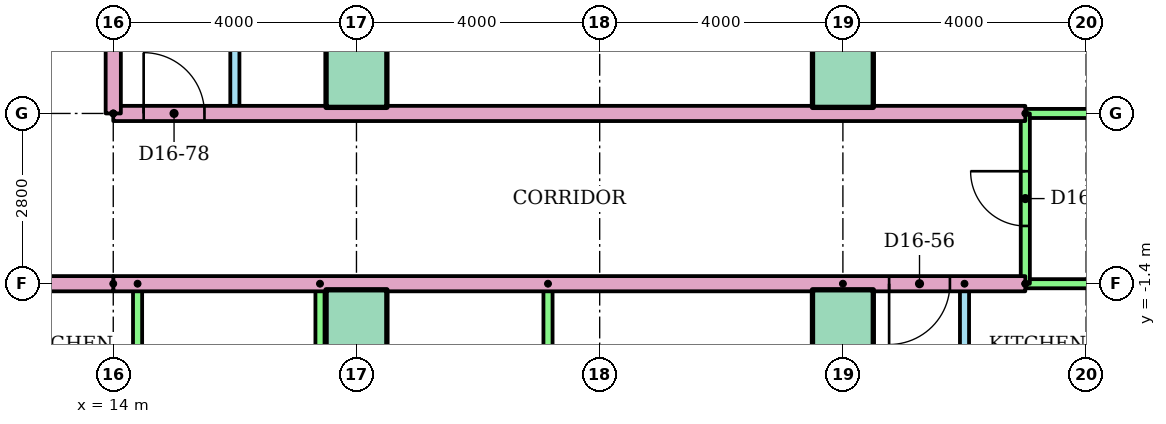
"""IFC4 building model, lengths in metres.
Left out: names, types, materials, properties, quantities, classifications, styles, units other than length and angle.
Written with IfcOpenShell. Run it as: python <this file> out.ifc"""

import sys

from ifc_helpers import new_model, si_unit, direction, frame, frame_2d, origin, origin_2d, place, context, subcontext, project, spatial, rectangle, extrude, element, fill, save


model = new_model("IFC4")
c1 = context("Model", 3, precision=1e-05, world=origin(), true_north=direction((0.0, 1.0)))
c2 = subcontext(c1, "Body", "Model", "MODEL_VIEW")
j1 = project(units=[si_unit("LENGTHUNIT", "METRE"), si_unit("PLANEANGLEUNIT", "RADIAN")], contexts=[c1])
p1 = place(None, origin())
s1 = spatial("IfcSite", under=j1, at=p1, CompositionType="ELEMENT")
p2 = place(p1, origin())
s2 = spatial("IfcBuilding", under=s1, at=p2, CompositionType="ELEMENT")
p3 = place(p2, frame((0.0, 0.0, 60.8)))
s3 = spatial("IfcBuildingStorey", under=s2, at=p3, CompositionType="ELEMENT", Elevation=60.8)
for number, where in (
    (1, (18.0, -2.0, 0.0)),
    (2, (26.0, -2.0, 0.0)),
    (3, (18.0, 2.0, 0.0)),
    (4, (26.0, 2.0, 0.0)),
):
    element("IfcColumn", number, at=place(p3, frame(where)), inside=s3, PredefinedType="COLUMN", context=c2, shape_type="SweptSolid", body=[
        extrude(rectangle(XDim=1.0, YDim=1.0, at=origin_2d()), origin(), (0.0, 0.0, 1.0), 3.2),
    ])
for number, where, z_axis, x_axis in (
    (5, (14.4, -1.4, 0.0), (0.0, 0.0, 1.0), (0.0, -1.0, 0.0)),
    (6, (17.4, -1.4, 0.0), (0.0, 0.0, 1.0), (0.0, -1.0, 0.0)),
    (7, (21.15, -1.4, 0.0), (0.0, 0.0, 1.0), (0.0, -1.0, 0.0)),
):
    element("IfcWall", number, at=place(p3, frame(where, z_axis=z_axis, x_axis=x_axis)), inside=s3, PredefinedType="PARTITIONING", context=c2, shape_type="SweptSolid", body=[
        extrude(rectangle(XDim=5.2, YDim=0.15, at=frame_2d((2.6, 0.0))), origin(), (0.0, 0.0, 1.0), 2.4),
    ])
p4 = place(p3, frame((28.0, -1.4, 0.0), z_axis=(0.0, 0.0, 1.0), x_axis=(0.0, -1.0, 0.0)))
e8 = element("IfcWall", 8, at=p4, inside=s3, PredefinedType="PARTITIONING", context=c2, shape_type="SweptSolid", body=[
    extrude(rectangle(XDim=5.2, YDim=0.15, at=frame_2d((2.6, 0.0))), origin(), (0.0, 0.0, 1.0), 2.4),
])
p5 = place(p4, frame((1.36, 0.0, 0.0)))
e9 = element("IfcOpeningElement", 9, at=p5, cuts=e8, PredefinedType="OPENING", context=c2, shape_type="SweptSolid", body=[
    extrude(rectangle(XDim=0.9, YDim=2.1, at=frame_2d((0.45, 1.05))), frame((0.0, 0.085, 0.0), z_axis=(0.0, -1.0, 0.0), x_axis=(1.0, 0.0, 0.0)), (0.0, 0.0, 1.0), 0.17),
])
p6 = place(p4, frame((3.575, 0.0, 0.0)))
e10 = element("IfcOpeningElement", 10, at=p6, cuts=e8, PredefinedType="OPENING", context=c2, shape_type="SweptSolid", body=[
    extrude(rectangle(XDim=0.8, YDim=2.1, at=frame_2d((0.4, 1.05))), frame((0.0, 0.085, 0.0), z_axis=(0.0, -1.0, 0.0), x_axis=(1.0, 0.0, 0.0)), (0.0, 0.0, 1.0), 0.17),
])
p7 = place(p3, frame((26.0, -1.4, 0.0), z_axis=(0.0, 0.0, 1.0), x_axis=(0.0, -1.0, 0.0)))
e11 = element("IfcWall", 11, at=p7, inside=s3, PredefinedType="PARTITIONING", context=c2, shape_type="SweptSolid", body=[
    extrude(rectangle(XDim=14.71, YDim=0.25, at=frame_2d((7.355, 0.0))), origin(), (0.0, 0.0, 1.0), 2.4),
])
p8 = place(p3, frame((29.0, -1.4, 0.0), z_axis=(0.0, 0.0, 1.0), x_axis=(-1.0, 0.0, 0.0)))
e12 = element("IfcWall", 12, at=p8, inside=s3, PredefinedType="PARTITIONING", context=c2, shape_type="SweptSolid", body=[
    extrude(rectangle(XDim=15.0, YDim=0.25, at=frame_2d((7.5, 0.0))), origin(), (0.0, 0.0, 1.0), 2.4),
])
p9 = place(p8, frame((1.24, 0.0, 0.0)))
e13 = element("IfcOpeningElement", 13, at=p9, cuts=e12, PredefinedType="OPENING", context=c2, shape_type="SweptSolid", body=[
    extrude(rectangle(XDim=1.0, YDim=2.1, at=frame_2d((0.5, 1.05))), frame((0.0, 0.135, 0.0), z_axis=(0.0, -1.0, 0.0), x_axis=(1.0, 0.0, 0.0)), (0.0, 0.0, 1.0), 0.27),
])
p10 = place(p3, frame((36.52, -1.4, 0.0), z_axis=(0.0, 0.0, 1.0), x_axis=(-1.0, 0.0, 0.0)))
e14 = element("IfcWall", 14, at=p10, inside=s3, PredefinedType="PARTITIONING", context=c2, shape_type="SweptSolid", body=[
    extrude(rectangle(XDim=7.52, YDim=0.15, at=frame_2d((3.76, 0.0))), origin(), (0.0, 0.0, 1.0), 2.4),
])
p11 = place(p3, frame((16.0, 9.0, 0.0), z_axis=(0.0, 0.0, 1.0), x_axis=(0.0, -1.0, 0.0)))
e15 = element("IfcWall", 15, at=p11, inside=s3, PredefinedType="PARTITIONING", context=c2, shape_type="SweptSolid", body=[
    extrude(rectangle(XDim=7.6, YDim=0.15, at=frame_2d((3.8, 0.0))), origin(), (0.0, 0.0, 1.0), 2.4),
])
p12 = place(p11, frame((5.025, 0.0, 0.0)))
e16 = element("IfcOpeningElement", 16, at=p12, cuts=e15, PredefinedType="OPENING", context=c2, shape_type="SweptSolid", body=[
    extrude(rectangle(XDim=0.9, YDim=2.1, at=frame_2d((0.45, 1.05))), frame((0.0, 0.085, 0.0), z_axis=(0.0, -1.0, 0.0), x_axis=(1.0, 0.0, 0.0)), (0.0, 0.0, 1.0), 0.17),
])
p13 = place(p11, frame((1.275, 0.0, 0.0)))
e17 = element("IfcOpeningElement", 17, at=p13, cuts=e15, PredefinedType="OPENING", context=c2, shape_type="SweptSolid", body=[
    extrude(rectangle(XDim=0.8, YDim=2.1, at=frame_2d((0.4, 1.05))), frame((0.0, 0.085, 0.0), z_axis=(0.0, -1.0, 0.0), x_axis=(1.0, 0.0, 0.0)), (0.0, 0.0, 1.0), 0.17),
])
for number, where, z_axis, x_axis in (
    (18, (18.4, 9.0, 0.0), (0.0, 0.0, 1.0), (0.0, -1.0, 0.0)),
    (19, (25.9, 9.0, 0.0), (0.0, 0.0, 1.0), (0.0, -1.0, 0.0)),
):
    element("IfcWall", number, at=place(p3, frame(where, z_axis=z_axis, x_axis=x_axis)), inside=s3, PredefinedType="PARTITIONING", context=c2, shape_type="SweptSolid", body=[
        extrude(rectangle(XDim=7.6, YDim=0.15, at=frame_2d((3.8, 0.0))), origin(), (0.0, 0.0, 1.0), 2.4),
    ])
p14 = place(p3, frame((14.0, 1.4, 0.0)))
e20 = element("IfcWall", 20, at=p14, inside=s3, PredefinedType="PARTITIONING", context=c2, shape_type="SweptSolid", body=[
    extrude(rectangle(XDim=15.0, YDim=0.25, at=frame_2d((7.5, 0.0))), origin(), (0.0, 0.0, 1.0), 2.4),
])
p15 = place(p14, frame((0.5, 0.0, 0.0)))
e21 = element("IfcOpeningElement", 21, at=p15, cuts=e20, PredefinedType="OPENING", context=c2, shape_type="SweptSolid", body=[
    extrude(rectangle(XDim=1.0, YDim=2.1, at=frame_2d((0.5, 1.05))), frame((0.0, 0.135, 0.0), z_axis=(0.0, -1.0, 0.0), x_axis=(1.0, 0.0, 0.0)), (0.0, 0.0, 1.0), 0.27),
])
p16 = place(p3, frame((29.0, 1.4, 0.0)))
e22 = element("IfcWall", 22, at=p16, inside=s3, PredefinedType="PARTITIONING", context=c2, shape_type="SweptSolid", body=[
    extrude(rectangle(XDim=7.52, YDim=0.15, at=frame_2d((3.76, 0.0))), origin(), (0.0, 0.0, 1.0), 2.4),
])
p17 = place(p3, frame((29.0, -1.4, 0.0), z_axis=(0.0, 0.0, 1.0), x_axis=(0.0, 1.0, 0.0)))
e23 = element("IfcWall", 23, at=p17, inside=s3, PredefinedType="PARTITIONING", context=c2, shape_type="SweptSolid", body=[
    extrude(rectangle(XDim=2.8, YDim=0.15, at=frame_2d((1.4, 0.0))), origin(), (0.0, 0.0, 1.0), 2.4),
])
p18 = place(p17, frame((0.95, 0.0, 0.0)))
e24 = element("IfcOpeningElement", 24, at=p18, cuts=e23, PredefinedType="OPENING", context=c2, shape_type="SweptSolid", body=[
    extrude(rectangle(XDim=0.9, YDim=2.1, at=frame_2d((0.45, 1.05))), frame((0.0, 0.085, 0.0), z_axis=(0.0, -1.0, 0.0), x_axis=(1.0, 0.0, 0.0)), (0.0, 0.0, 1.0), 0.17),
])
p19 = place(p3, frame((14.0, -1.4, 0.0), z_axis=(0.0, 0.0, 1.0), x_axis=(-1.0, 0.0, 0.0)))
e25 = element("IfcWall", 25, at=p19, inside=s3, PredefinedType="PARTITIONING", context=c2, shape_type="SweptSolid", body=[
    extrude(rectangle(XDim=28.0, YDim=0.25, at=frame_2d((14.0, 0.0))), origin(), (0.0, 0.0, 1.0), 2.4),
])
p20 = place(p19, frame((20.76, 0.0, 0.0)))
e26 = element("IfcOpeningElement", 26, at=p20, cuts=e25, PredefinedType="OPENING", context=c2, shape_type="SweptSolid", body=[
    extrude(rectangle(XDim=1.0, YDim=2.1, at=frame_2d((0.5, 1.05))), frame((0.0, 0.135, 0.0), z_axis=(0.0, -1.0, 0.0), x_axis=(1.0, 0.0, 0.0)), (0.0, 0.0, 1.0), 0.27),
])
p21 = place(p19, frame((18.24, 0.0, 0.0)))
e27 = element("IfcOpeningElement", 27, at=p21, cuts=e25, PredefinedType="OPENING", context=c2, shape_type="SweptSolid", body=[
    extrude(rectangle(XDim=1.0, YDim=2.1, at=frame_2d((0.5, 1.05))), frame((0.0, 0.135, 0.0), z_axis=(0.0, -1.0, 0.0), x_axis=(1.0, 0.0, 0.0)), (0.0, 0.0, 1.0), 0.27),
])
p22 = place(p19, frame((2.24, 0.0, 0.0)))
e28 = element("IfcOpeningElement", 28, at=p22, cuts=e25, PredefinedType="OPENING", context=c2, shape_type="SweptSolid", body=[
    extrude(rectangle(XDim=1.0, YDim=2.1, at=frame_2d((0.5, 1.05))), frame((0.0, 0.135, 0.0), z_axis=(0.0, -1.0, 0.0), x_axis=(1.0, 0.0, 0.0)), (0.0, 0.0, 1.0), 0.27),
])
p23 = place(p3, frame((14.0, 1.4, 0.0), z_axis=(0.0, 0.0, 1.0), x_axis=(0.0, 1.0, 0.0)))
e29 = element("IfcWall", 29, at=p23, inside=s3, PredefinedType="PARTITIONING", context=c2, shape_type="SweptSolid", body=[
    extrude(rectangle(XDim=1.6, YDim=0.25, at=frame_2d((0.8, 0.0))), origin(), (0.0, 0.0, 1.0), 2.4),
])
p24 = place(p9, origin())
e30 = element("IfcDoor", 30, at=p24, inside=s3, OperationType="SINGLE_SWING_RIGHT", PredefinedType="DOOR", context=c2, shape_type="SweptSolid", body=[
    extrude(rectangle(XDim=1.0, YDim=2.1, at=frame_2d((0.5, 1.05))), frame((0.0, 0.025, 0.0), z_axis=(0.0, -1.0, 0.0), x_axis=(1.0, 0.0, 0.0)), (0.0, 0.0, 1.0), 0.05),
])
fill(e13, e30)
p25 = place(p15, origin())
e31 = element("IfcDoor", 31, at=p25, inside=s3, OperationType="SINGLE_SWING_LEFT", PredefinedType="DOOR", context=c2, shape_type="SweptSolid", body=[
    extrude(rectangle(XDim=1.0, YDim=2.1, at=frame_2d((0.5, 1.05))), frame((0.0, 0.025, 0.0), z_axis=(0.0, -1.0, 0.0), x_axis=(1.0, 0.0, 0.0)), (0.0, 0.0, 1.0), 0.05),
])
fill(e21, e31)
p26 = place(p18, origin())
e32 = element("IfcDoor", 32, at=p26, inside=s3, OperationType="SINGLE_SWING_RIGHT", PredefinedType="DOOR", context=c2, shape_type="SweptSolid", body=[
    extrude(rectangle(XDim=0.9, YDim=2.1, at=frame_2d((0.45, 1.05))), frame((0.0, 0.025, 0.0), z_axis=(0.0, -1.0, 0.0), x_axis=(1.0, 0.0, 0.0)), (0.0, 0.0, 1.0), 0.05),
])
fill(e24, e32)
save(model, sys.argv[1])
